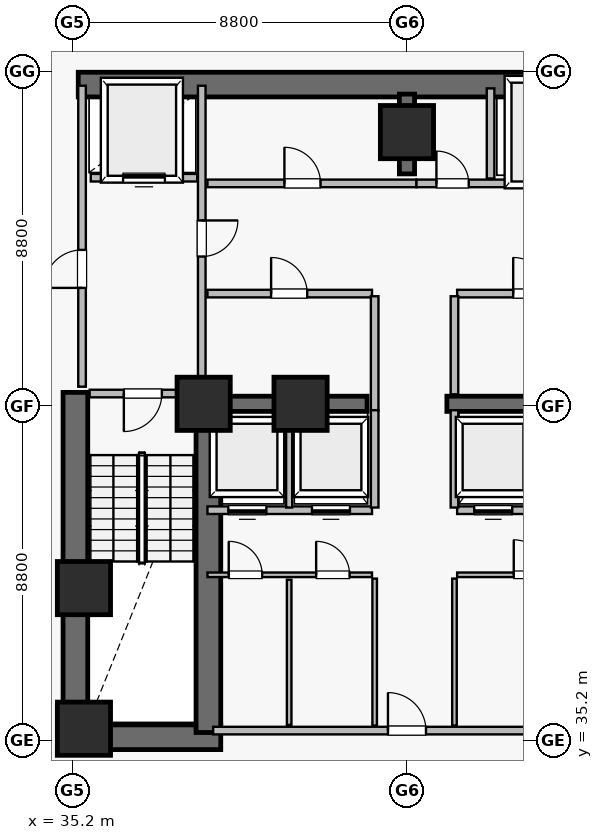
"""IFC4 building model, lengths in metres.
Left out: names, types, materials, properties, quantities, classifications, styles, units other than length and angle.
Written with IfcOpenShell. Run it as: python <this file> out.ifc"""

import sys

from ifc_helpers import new_model, si_unit, direction, frame, frame_2d, origin, origin_2d, place, context, subcontext, project, spatial, rectangle, extrude, element, fill, save


model = new_model("IFC4")
c1 = context("Model", 3, precision=1e-05, world=origin(), true_north=direction((0.0, 1.0)))
c2 = subcontext(c1, "Body", "Model", "MODEL_VIEW")
j1 = project(units=[si_unit("LENGTHUNIT", "METRE"), si_unit("PLANEANGLEUNIT", "RADIAN")], contexts=[c1])
p1 = place(None, origin())
s1 = spatial("IfcSite", under=j1, at=p1, CompositionType="ELEMENT")
p2 = place(p1, origin())
s2 = spatial("IfcBuilding", under=s1, at=p2, CompositionType="ELEMENT")
p3 = place(p2, frame((0.0, 0.0, -11.7)))
s3 = spatial("IfcBuildingStorey", under=s2, at=p3, CompositionType="ELEMENT", Elevation=-11.7)
p4 = place(p3, frame((35.35, 52.45, 0.0), z_axis=(0.0, 0.0, 1.0), x_axis=(1.0, 0.0, 0.0)))
e1 = element("IfcWall", 1, at=p4, inside=s3, PredefinedType="SHEAR", context=c2, shape_type="SweptSolid", body=[
    extrude(rectangle(XDim=17.3, YDim=0.65, at=frame_2d((8.65, 0.0))), origin(), (0.0, 0.0, 1.0), 3.58),
])
p5 = place(p3, frame((34.95, 35.275, 0.0), z_axis=(0.0, 0.0, 1.0), x_axis=(1.0, 0.0, 0.0)))
e2 = element("IfcWall", 2, at=p5, inside=s3, PredefinedType="SHEAR", context=c2, shape_type="SweptSolid", body=[
    extrude(rectangle(XDim=4.15, YDim=0.65, at=frame_2d((2.075, 0.0))), origin(), (0.0, 0.0, 1.0), 3.58),
])
p6 = place(p3, frame((35.275, 34.95, 0.0), z_axis=(0.0, 0.0, 1.0), x_axis=(0.0, 1.0, 0.0)))
e3 = element("IfcWall", 3, at=p6, inside=s3, PredefinedType="SHEAR", context=c2, shape_type="SweptSolid", body=[
    extrude(rectangle(XDim=9.4, YDim=0.65, at=frame_2d((4.7, 0.0))), origin(), (0.0, 0.0, 1.0), 3.58),
])
p7 = place(p3, frame((38.775, 35.4, 0.0), z_axis=(0.0, 0.0, 1.0), x_axis=(0.0, 1.0, 0.0)))
e4 = element("IfcWall", 4, at=p7, inside=s3, PredefinedType="SHEAR", context=c2, shape_type="SweptSolid", body=[
    extrude(rectangle(XDim=8.95, YDim=0.65, at=frame_2d((4.475, 0.0))), origin(), (0.0, 0.0, 1.0), 3.58),
])
p8 = place(p3, frame((44.0, 50.1, 0.0), z_axis=(0.0, 0.0, 1.0), x_axis=(0.0, 1.0, 0.0)))
e5 = element("IfcWall", 5, at=p8, inside=s3, PredefinedType="SHEAR", context=c2, shape_type="SweptSolid", body=[
    extrude(rectangle(XDim=2.1, YDim=0.4, at=frame_2d((1.05, 0.0))), origin(), (0.0, 0.0, 1.0), 3.58),
])
for number, where, z_axis, x_axis in (
    (6, (38.75, 44.05, 0.0), (0.0, 0.0, 1.0), (1.0, 0.0, 0.0)),
    (7, (45.05, 44.05, 0.0), (0.0, 0.0, 1.0), (1.0, 0.0, 0.0)),
):
    element("IfcWall", number, at=place(p3, frame(where, z_axis=z_axis, x_axis=x_axis)), inside=s3, PredefinedType="SHEAR", context=c2, shape_type="SweptSolid", body=[
        extrude(rectangle(XDim=4.2, YDim=0.4, at=frame_2d((2.1, 0.0))), origin(), (0.0, 0.0, 1.0), 3.58),
    ])
for number, where, z_axis, x_axis in (
    (8, (35.5, 35.5, 0.0), (0.0, 0.0, 1.0), (1.0, 0.0, 0.0)),
    (9, (38.65, 44.05, 0.0), (0.0, 0.0, 1.0), (1.0, 0.0, 0.0)),
    (10, (44.0, 51.2, 0.0), (0.0, 0.0, 1.0), (1.0, 0.0, 0.0)),
    (11, (35.5, 39.2, 0.0), (0.0, 0.0, 1.0), (1.0, 0.0, 0.0)),
    (12, (41.2, 44.05, 0.0), (0.0, 0.0, 1.0), (1.0, 0.0, 0.0)),
):
    element("IfcColumn", number, at=place(p3, frame(where, z_axis=z_axis, x_axis=x_axis)), inside=s3, PredefinedType="COLUMN", context=c2, shape_type="SweptSolid", body=[
        extrude(rectangle(XDim=1.4, YDim=1.4, at=origin_2d()), origin(), (0.0, 0.0, 1.0), 3.9),
    ])
p9 = place(p3, frame((38.9, 35.45, 0.0), z_axis=(0.0, 0.0, 1.0), x_axis=(1.0, 0.0, 0.0)))
e13 = element("IfcWall", 13, at=p9, inside=s3, PredefinedType="SOLIDWALL", context=c2, shape_type="SweptSolid", body=[
    extrude(rectangle(XDim=10.2, YDim=0.2, at=frame_2d((5.1, 0.0))), origin(), (0.0, 0.0, 1.0), 3.58),
])
p10 = place(p9, frame((4.6, 0.0, 0.0)))
e14 = element("IfcOpeningElement", 14, at=p10, cuts=e13, PredefinedType="OPENING", context=c2, shape_type="SweptSolid", body=[
    extrude(rectangle(XDim=1.0, YDim=2.15, at=frame_2d((0.5, 1.075))), frame((0.0, 0.11, 0.0), z_axis=(0.0, -1.0, 0.0), x_axis=(1.0, 0.0, 0.0)), (0.0, 0.0, 1.0), 0.22),
])
p11 = place(p3, frame((35.45, 44.5, 0.0), z_axis=(0.0, 0.0, 1.0), x_axis=(0.0, 1.0, 0.0)))
e15 = element("IfcWall", 15, at=p11, inside=s3, PredefinedType="SOLIDWALL", context=c2, shape_type="SweptSolid", body=[
    extrude(rectangle(XDim=7.92, YDim=0.2, at=frame_2d((3.96, 0.0))), origin(), (0.0, 0.0, 1.0), 3.58),
])
p12 = place(p11, frame((2.6, 0.0, 0.0)))
e16 = element("IfcOpeningElement", 16, at=p12, cuts=e15, PredefinedType="OPENING", context=c2, shape_type="SweptSolid", body=[
    extrude(rectangle(XDim=1.0, YDim=2.15, at=frame_2d((0.5, 1.075))), frame((0.0, 0.11, 0.0), z_axis=(0.0, -1.0, 0.0), x_axis=(1.0, 0.0, 0.0)), (0.0, 0.0, 1.0), 0.22),
])
p13 = place(p3, frame((38.6, 44.5, 0.0), z_axis=(0.0, 0.0, 1.0), x_axis=(0.0, 1.0, 0.0)))
e17 = element("IfcWall", 17, at=p13, inside=s3, PredefinedType="SOLIDWALL", context=c2, shape_type="SweptSolid", body=[
    extrude(rectangle(XDim=7.92, YDim=0.2, at=frame_2d((3.96, 0.0))), origin(), (0.0, 0.0, 1.0), 3.58),
])
p14 = place(p13, frame((3.425, 0.0, 0.0)))
e18 = element("IfcOpeningElement", 18, at=p14, cuts=e17, PredefinedType="OPENING", context=c2, shape_type="SweptSolid", body=[
    extrude(rectangle(XDim=0.95, YDim=2.15, at=frame_2d((0.475, 1.075))), frame((0.0, 0.11, 0.0), z_axis=(0.0, -1.0, 0.0), x_axis=(1.0, 0.0, 0.0)), (0.0, 0.0, 1.0), 0.22),
])
p15 = place(p3, frame((38.75, 49.85, 0.0), z_axis=(0.0, 0.0, 1.0), x_axis=(1.0, 0.0, 0.0)))
e19 = element("IfcWall", 19, at=p15, inside=s3, PredefinedType="SOLIDWALL", context=c2, shape_type="SweptSolid", body=[
    extrude(rectangle(XDim=5.5, YDim=0.2, at=frame_2d((2.75, 0.0))), origin(), (0.0, 0.0, 1.0), 3.58),
])
p16 = place(p15, frame((2.025, 0.0, 0.0)))
e20 = element("IfcOpeningElement", 20, at=p16, cuts=e19, PredefinedType="OPENING", context=c2, shape_type="SweptSolid", body=[
    extrude(rectangle(XDim=0.95, YDim=2.15, at=frame_2d((0.475, 1.075))), frame((0.0, 0.11, 0.0), z_axis=(0.0, -1.0, 0.0), x_axis=(1.0, 0.0, 0.0)), (0.0, 0.0, 1.0), 0.22),
])
p17 = place(p3, frame((44.25, 49.85, 0.0), z_axis=(0.0, 0.0, 1.0), x_axis=(1.0, 0.0, 0.0)))
e21 = element("IfcWall", 21, at=p17, inside=s3, PredefinedType="SOLIDWALL", context=c2, shape_type="SweptSolid", body=[
    extrude(rectangle(XDim=5.0, YDim=0.2, at=frame_2d((2.5, 0.0))), origin(), (0.0, 0.0, 1.0), 2.918),
])
p18 = place(p17, frame((0.525, 0.0, 0.0)))
e22 = element("IfcOpeningElement", 22, at=p18, cuts=e21, PredefinedType="OPENING", context=c2, shape_type="SweptSolid", body=[
    extrude(rectangle(XDim=0.85, YDim=2.1, at=frame_2d((0.425, 1.05))), frame((0.0, 0.11, 0.0), z_axis=(0.0, -1.0, 0.0), x_axis=(1.0, 0.0, 0.0)), (0.0, 0.0, 1.0), 0.22),
])
p19 = place(p17, frame((2.95, 0.0, 0.0)))
e23 = element("IfcOpeningElement", 23, at=p19, cuts=e21, PredefinedType="OPENING", context=c2, shape_type="SweptSolid", body=[
    extrude(rectangle(XDim=1.1, YDim=2.15, at=frame_2d((0.55, 1.075))), frame((0.0, 0.11, 0.0), z_axis=(0.0, -1.0, 0.0), x_axis=(1.0, 0.0, 0.0)), (0.0, 0.0, 1.0), 0.22),
])
p20 = place(p3, frame((38.75, 46.95, 0.0), z_axis=(0.0, 0.0, 1.0), x_axis=(1.0, 0.0, 0.0)))
e24 = element("IfcWall", 24, at=p20, inside=s3, PredefinedType="SOLIDWALL", context=c2, shape_type="SweptSolid", body=[
    extrude(rectangle(XDim=4.33, YDim=0.2, at=frame_2d((2.165, 0.0))), origin(), (0.0, 0.0, 1.0), 3.58),
])
p21 = place(p20, frame((1.675, 0.0, 0.0)))
e25 = element("IfcOpeningElement", 25, at=p21, cuts=e24, PredefinedType="OPENING", context=c2, shape_type="SweptSolid", body=[
    extrude(rectangle(XDim=0.95, YDim=2.15, at=frame_2d((0.475, 1.075))), frame((0.0, 0.11, 0.0), z_axis=(0.0, -1.0, 0.0), x_axis=(1.0, 0.0, 0.0)), (0.0, 0.0, 1.0), 0.22),
])
p22 = place(p3, frame((38.75, 41.25, 0.0), z_axis=(0.0, 0.0, 1.0), x_axis=(1.0, 0.0, 0.0)))
e26 = element("IfcWall", 26, at=p22, inside=s3, PredefinedType="SOLIDWALL", context=c2, shape_type="SweptSolid", body=[
    extrude(rectangle(XDim=4.33, YDim=0.2, at=frame_2d((2.165, 0.0))), origin(), (0.0, 0.0, 1.0), 3.58),
])
p23 = place(p22, frame((0.55, 0.0, 0.0)))
e27 = element("IfcOpeningElement", 27, at=p23, cuts=e26, PredefinedType="OPENING", context=c2, shape_type="SweptSolid", body=[
    extrude(rectangle(XDim=1.0, YDim=2.15, at=frame_2d((0.5, 1.075))), frame((0.0, 0.11, 0.0), z_axis=(0.0, -1.0, 0.0), x_axis=(1.0, 0.0, 0.0)), (0.0, 0.0, 1.0), 0.22),
])
p24 = place(p22, frame((2.75, 0.0, 0.0)))
e28 = element("IfcOpeningElement", 28, at=p24, cuts=e26, PredefinedType="OPENING", context=c2, shape_type="SweptSolid", body=[
    extrude(rectangle(XDim=1.0, YDim=2.15, at=frame_2d((0.5, 1.075))), frame((0.0, 0.11, 0.0), z_axis=(0.0, -1.0, 0.0), x_axis=(1.0, 0.0, 0.0)), (0.0, 0.0, 1.0), 0.22),
])
p25 = place(p3, frame((38.75, 39.55, 0.0), z_axis=(0.0, 0.0, 1.0), x_axis=(1.0, 0.0, 0.0)))
e29 = element("IfcWall", 29, at=p25, inside=s3, PredefinedType="PARTITIONING", context=c2, shape_type="SweptSolid", body=[
    extrude(rectangle(XDim=4.33, YDim=0.12, at=frame_2d((2.165, 0.0))), origin(), (0.0, 0.0, 1.0), 3.58),
])
p26 = place(p25, frame((0.56, 0.0, 0.0)))
e30 = element("IfcOpeningElement", 30, at=p26, cuts=e29, PredefinedType="OPENING", context=c2, shape_type="SweptSolid", body=[
    extrude(rectangle(XDim=0.88, YDim=2.1, at=frame_2d((0.44, 1.05))), frame((0.0, 0.07, 0.0), z_axis=(0.0, -1.0, 0.0), x_axis=(1.0, 0.0, 0.0)), (0.0, 0.0, 1.0), 0.14),
])
p27 = place(p25, frame((2.86, 0.0, 0.0)))
e31 = element("IfcOpeningElement", 31, at=p27, cuts=e29, PredefinedType="OPENING", context=c2, shape_type="SweptSolid", body=[
    extrude(rectangle(XDim=0.88, YDim=2.1, at=frame_2d((0.44, 1.05))), frame((0.0, 0.07, 0.0), z_axis=(0.0, -1.0, 0.0), x_axis=(1.0, 0.0, 0.0)), (0.0, 0.0, 1.0), 0.14),
])
p28 = place(p3, frame((45.32, 46.95, 0.0), z_axis=(0.0, 0.0, 1.0), x_axis=(1.0, 0.0, 0.0)))
e32 = element("IfcWall", 32, at=p28, inside=s3, PredefinedType="SOLIDWALL", context=c2, shape_type="SweptSolid", body=[
    extrude(rectangle(XDim=3.93, YDim=0.2, at=frame_2d((1.965, 0.0))), origin(), (0.0, 0.0, 1.0), 2.918),
])
p29 = place(p28, frame((1.475, 0.0, 0.0)))
e33 = element("IfcOpeningElement", 33, at=p29, cuts=e32, PredefinedType="OPENING", context=c2, shape_type="SweptSolid", body=[
    extrude(rectangle(XDim=0.95, YDim=2.15, at=frame_2d((0.475, 1.075))), frame((0.0, 0.11, 0.0), z_axis=(0.0, -1.0, 0.0), x_axis=(1.0, 0.0, 0.0)), (0.0, 0.0, 1.0), 0.22),
])
p30 = place(p3, frame((45.32, 41.25, 0.0), z_axis=(0.0, 0.0, 1.0), x_axis=(1.0, 0.0, 0.0)))
e34 = element("IfcWall", 34, at=p30, inside=s3, PredefinedType="SOLIDWALL", context=c2, shape_type="SweptSolid", body=[
    extrude(rectangle(XDim=3.93, YDim=0.2, at=frame_2d((1.965, 0.0))), origin(), (0.0, 0.0, 1.0), 3.58),
])
p31 = place(p30, frame((0.45, 0.0, 0.0)))
e35 = element("IfcOpeningElement", 35, at=p31, cuts=e34, PredefinedType="OPENING", context=c2, shape_type="SweptSolid", body=[
    extrude(rectangle(XDim=1.0, YDim=2.15, at=frame_2d((0.5, 1.075))), frame((0.0, 0.11, 0.0), z_axis=(0.0, -1.0, 0.0), x_axis=(1.0, 0.0, 0.0)), (0.0, 0.0, 1.0), 0.22),
])
p32 = place(p30, frame((2.45, 0.0, 0.0)))
e36 = element("IfcOpeningElement", 36, at=p32, cuts=e34, PredefinedType="OPENING", context=c2, shape_type="SweptSolid", body=[
    extrude(rectangle(XDim=1.0, YDim=2.15, at=frame_2d((0.5, 1.075))), frame((0.0, 0.11, 0.0), z_axis=(0.0, -1.0, 0.0), x_axis=(1.0, 0.0, 0.0)), (0.0, 0.0, 1.0), 0.22),
])
p33 = place(p3, frame((45.32, 39.55, 0.0), z_axis=(0.0, 0.0, 1.0), x_axis=(1.0, 0.0, 0.0)))
e37 = element("IfcWall", 37, at=p33, inside=s3, PredefinedType="PARTITIONING", context=c2, shape_type="SweptSolid", body=[
    extrude(rectangle(XDim=3.93, YDim=0.12, at=frame_2d((1.965, 0.0))), origin(), (0.0, 0.0, 1.0), 3.58),
])
p34 = place(p33, frame((1.49, 0.0, 0.0)))
e38 = element("IfcOpeningElement", 38, at=p34, cuts=e37, PredefinedType="OPENING", context=c2, shape_type="SweptSolid", body=[
    extrude(rectangle(XDim=0.92, YDim=2.1, at=frame_2d((0.46, 1.05))), frame((0.0, 0.07, 0.0), z_axis=(0.0, -1.0, 0.0), x_axis=(1.0, 0.0, 0.0)), (0.0, 0.0, 1.0), 0.14),
])
p35 = place(p3, frame((35.65, 44.32, 0.0), z_axis=(0.0, 0.0, 1.0), x_axis=(1.0, 0.0, 0.0)))
e39 = element("IfcWall", 39, at=p35, inside=s3, PredefinedType="SOLIDWALL", context=c2, shape_type="SweptSolid", body=[
    extrude(rectangle(XDim=2.8, YDim=0.2, at=frame_2d((1.4, 0.0))), origin(), (0.0, 0.0, 1.0), 3.58),
])
p36 = place(p35, frame((0.9, 0.0, 0.0)))
e40 = element("IfcOpeningElement", 40, at=p36, cuts=e39, PredefinedType="OPENING", context=c2, shape_type="SweptSolid", body=[
    extrude(rectangle(XDim=1.0, YDim=2.15, at=frame_2d((0.5, 1.075))), frame((0.0, 0.11, 0.0), z_axis=(0.0, -1.0, 0.0), x_axis=(1.0, 0.0, 0.0)), (0.0, 0.0, 1.0), 0.22),
])
p37 = place(p3, frame((35.68, 50.0, 0.0), z_axis=(0.0, 0.0, 1.0), x_axis=(1.0, 0.0, 0.0)))
e41 = element("IfcWall", 41, at=p37, inside=s3, PredefinedType="SOLIDWALL", context=c2, shape_type="SweptSolid", body=[
    extrude(rectangle(XDim=2.8, YDim=0.2, at=frame_2d((1.4, 0.0))), origin(), (0.0, 0.0, 1.0), 3.58),
])
p38 = place(p37, frame((0.85, 0.0, 0.0)))
e42 = element("IfcOpeningElement", 42, at=p38, cuts=e41, PredefinedType="OPENING", context=c2, shape_type="SweptSolid", body=[
    extrude(rectangle(XDim=1.1, YDim=2.15, at=frame_2d((0.55, 1.075))), frame((0.0, 0.11, 0.0), z_axis=(0.0, -1.0, 0.0), x_axis=(1.0, 0.0, 0.0)), (0.0, 0.0, 1.0), 0.22),
])
for number, where, z_axis, x_axis in (
    (43, (43.15, 35.58, 0.0), (0.0, 0.0, 1.0), (0.0, 1.0, 0.0)),
    (44, (45.25, 35.58, 0.0), (0.0, 0.0, 1.0), (0.0, 1.0, 0.0)),
):
    element("IfcWall", number, at=place(p3, frame(where, z_axis=z_axis, x_axis=x_axis)), inside=s3, PredefinedType="PARTITIONING", context=c2, shape_type="SweptSolid", body=[
        extrude(rectangle(XDim=3.87, YDim=0.12, at=frame_2d((1.935, 0.0))), origin(), (0.0, 0.0, 1.0), 3.58),
    ])
p39 = place(p3, frame((40.9, 35.6, 0.0), z_axis=(0.0, 0.0, 1.0), x_axis=(0.0, 1.0, 0.0)))
e45 = element("IfcWall", 45, at=p39, inside=s3, PredefinedType="PARTITIONING", context=c2, shape_type="SweptSolid", body=[
    extrude(rectangle(XDim=3.82, YDim=0.12, at=frame_2d((1.91, 0.0))), origin(), (0.0, 0.0, 1.0), 3.58),
])
p40 = place(p3, frame((43.15, 43.88, 0.0), z_axis=(0.0, 0.0, 1.0), x_axis=(0.0, 1.0, 0.0)))
e46 = element("IfcWall", 46, at=p40, inside=s3, PredefinedType="SOLIDWALL", context=c2, shape_type="SweptSolid", body=[
    extrude(rectangle(XDim=3.0, YDim=0.2, at=frame_2d((1.5, 0.0))), origin(), (0.0, 0.0, 1.0), 3.58),
])
p41 = place(p3, frame((45.25, 44.3, 0.0), z_axis=(0.0, 0.0, 1.0), x_axis=(0.0, 1.0, 0.0)))
e47 = element("IfcWall", 47, at=p41, inside=s3, PredefinedType="SOLIDWALL", context=c2, shape_type="SweptSolid", body=[
    extrude(rectangle(XDim=2.58, YDim=0.2, at=frame_2d((1.29, 0.0))), origin(), (0.0, 0.0, 1.0), 3.58),
])
for number, where, z_axis, x_axis in (
    (48, (43.15, 41.32, 0.0), (0.0, 0.0, 1.0), (0.0, 1.0, 0.0)),
    (49, (45.25, 41.32, 0.0), (0.0, 0.0, 1.0), (0.0, 1.0, 0.0)),
):
    element("IfcWall", number, at=place(p3, frame(where, z_axis=z_axis, x_axis=x_axis)), inside=s3, PredefinedType="SOLIDWALL", context=c2, shape_type="SweptSolid", body=[
        extrude(rectangle(XDim=2.56, YDim=0.2, at=frame_2d((1.28, 0.0))), origin(), (0.0, 0.0, 1.0), 3.58),
    ])
p42 = place(p3, frame((40.9, 41.32, 0.0), z_axis=(0.0, 0.0, 1.0), x_axis=(0.0, 1.0, 0.0)))
e50 = element("IfcWall", 50, at=p42, inside=s3, PredefinedType="SOLIDWALL", context=c2, shape_type="SweptSolid", body=[
    extrude(rectangle(XDim=2.53, YDim=0.16, at=frame_2d((1.265, 0.0))), origin(), (0.0, 0.0, 1.0), 3.58),
])
p43 = place(p3, frame((46.2, 49.98, 0.0), z_axis=(0.0, 0.0, 1.0), x_axis=(0.0, 1.0, 0.0)))
e51 = element("IfcWall", 51, at=p43, inside=s3, PredefinedType="SOLIDWALL", context=c2, shape_type="SweptSolid", body=[
    extrude(rectangle(XDim=2.37, YDim=0.2, at=frame_2d((1.185, 0.0))), origin(), (0.0, 0.0, 1.0), 3.58),
])
p44 = place(p36, frame((1.0, 0.0, 0.0), z_axis=(0.0, 0.0, 1.0), x_axis=(-1.0, 0.0, 0.0)))
e52 = element("IfcDoor", 52, at=p44, inside=s3, OperationType="SINGLE_SWING_LEFT", PredefinedType="DOOR", context=c2, shape_type="SweptSolid", body=[
    extrude(rectangle(XDim=1.0, YDim=2.15, at=frame_2d((0.5, 1.075))), frame((0.0, 0.025, 0.0), z_axis=(0.0, -1.0, 0.0), x_axis=(1.0, 0.0, 0.0)), (0.0, 0.0, 1.0), 0.05),
])
fill(e40, e52)
p45 = place(p12, origin())
e53 = element("IfcDoor", 53, at=p45, inside=s3, OperationType="SINGLE_SWING_LEFT", PredefinedType="DOOR", context=c2, shape_type="SweptSolid", body=[
    extrude(rectangle(XDim=1.0, YDim=2.15, at=frame_2d((0.5, 1.075))), frame((0.0, 0.025, 0.0), z_axis=(0.0, -1.0, 0.0), x_axis=(1.0, 0.0, 0.0)), (0.0, 0.0, 1.0), 0.05),
])
fill(e16, e53)
p46 = place(p14, frame((0.95, 0.0, 0.0), z_axis=(0.0, 0.0, 1.0), x_axis=(-1.0, 0.0, 0.0)))
e54 = element("IfcDoor", 54, at=p46, inside=s3, OperationType="SINGLE_SWING_RIGHT", PredefinedType="DOOR", context=c2, shape_type="SweptSolid", body=[
    extrude(rectangle(XDim=0.95, YDim=2.15, at=frame_2d((0.475, 1.075))), frame((0.0, 0.025, 0.0), z_axis=(0.0, -1.0, 0.0), x_axis=(1.0, 0.0, 0.0)), (0.0, 0.0, 1.0), 0.05),
])
fill(e18, e54)
p47 = place(p38, origin())
e55 = element("IfcDoor", 55, at=p47, inside=s3, OperationType="SLIDING_TO_LEFT", PredefinedType="DOOR", context=c2, shape_type="SweptSolid", body=[
    extrude(rectangle(XDim=1.1, YDim=2.15, at=frame_2d((0.55, 1.075))), frame((0.0, 0.025, 0.0), z_axis=(0.0, -1.0, 0.0), x_axis=(1.0, 0.0, 0.0)), (0.0, 0.0, 1.0), 0.05),
])
fill(e42, e55)
p48 = place(p10, origin())
e56 = element("IfcDoor", 56, at=p48, inside=s3, OperationType="SINGLE_SWING_LEFT", PredefinedType="DOOR", context=c2, shape_type="SweptSolid", body=[
    extrude(rectangle(XDim=1.0, YDim=2.15, at=frame_2d((0.5, 1.075))), frame((0.0, 0.025, 0.0), z_axis=(0.0, -1.0, 0.0), x_axis=(1.0, 0.0, 0.0)), (0.0, 0.0, 1.0), 0.05),
])
fill(e14, e56)
p49 = place(p16, origin())
e57 = element("IfcDoor", 57, at=p49, inside=s3, OperationType="SINGLE_SWING_LEFT", PredefinedType="DOOR", context=c2, shape_type="SweptSolid", body=[
    extrude(rectangle(XDim=0.95, YDim=2.15, at=frame_2d((0.475, 1.075))), frame((0.0, 0.025, 0.0), z_axis=(0.0, -1.0, 0.0), x_axis=(1.0, 0.0, 0.0)), (0.0, 0.0, 1.0), 0.05),
])
fill(e20, e57)
p50 = place(p18, origin())
e58 = element("IfcDoor", 58, at=p50, inside=s3, OperationType="SINGLE_SWING_LEFT", PredefinedType="DOOR", context=c2, shape_type="SweptSolid", body=[
    extrude(rectangle(XDim=0.85, YDim=2.1, at=frame_2d((0.425, 1.05))), frame((0.0, 0.025, 0.0), z_axis=(0.0, -1.0, 0.0), x_axis=(1.0, 0.0, 0.0)), (0.0, 0.0, 1.0), 0.05),
])
fill(e22, e58)
p51 = place(p21, origin())
e59 = element("IfcDoor", 59, at=p51, inside=s3, OperationType="SINGLE_SWING_LEFT", PredefinedType="DOOR", context=c2, shape_type="SweptSolid", body=[
    extrude(rectangle(XDim=0.95, YDim=2.15, at=frame_2d((0.475, 1.075))), frame((0.0, 0.025, 0.0), z_axis=(0.0, -1.0, 0.0), x_axis=(1.0, 0.0, 0.0)), (0.0, 0.0, 1.0), 0.05),
])
fill(e25, e59)
p52 = place(p29, origin())
e60 = element("IfcDoor", 60, at=p52, inside=s3, OperationType="SINGLE_SWING_LEFT", PredefinedType="DOOR", context=c2, shape_type="SweptSolid", body=[
    extrude(rectangle(XDim=0.95, YDim=2.15, at=frame_2d((0.475, 1.075))), frame((0.0, 0.025, 0.0), z_axis=(0.0, -1.0, 0.0), x_axis=(1.0, 0.0, 0.0)), (0.0, 0.0, 1.0), 0.05),
])
fill(e33, e60)
p53 = place(p23, frame((1.0, 0.0, 0.0), z_axis=(0.0, 0.0, 1.0), x_axis=(-1.0, 0.0, 0.0)))
e61 = element("IfcDoor", 61, at=p53, inside=s3, OperationType="SLIDING_TO_LEFT", PredefinedType="DOOR", context=c2, shape_type="SweptSolid", body=[
    extrude(rectangle(XDim=1.0, YDim=2.15, at=frame_2d((0.5, 1.075))), frame((0.0, 0.025, 0.0), z_axis=(0.0, -1.0, 0.0), x_axis=(1.0, 0.0, 0.0)), (0.0, 0.0, 1.0), 0.05),
])
fill(e27, e61)
p54 = place(p24, frame((1.0, 0.0, 0.0), z_axis=(0.0, 0.0, 1.0), x_axis=(-1.0, 0.0, 0.0)))
e62 = element("IfcDoor", 62, at=p54, inside=s3, OperationType="SLIDING_TO_LEFT", PredefinedType="DOOR", context=c2, shape_type="SweptSolid", body=[
    extrude(rectangle(XDim=1.0, YDim=2.15, at=frame_2d((0.5, 1.075))), frame((0.0, 0.025, 0.0), z_axis=(0.0, -1.0, 0.0), x_axis=(1.0, 0.0, 0.0)), (0.0, 0.0, 1.0), 0.05),
])
fill(e28, e62)
p55 = place(p31, frame((1.0, 0.0, 0.0), z_axis=(0.0, 0.0, 1.0), x_axis=(-1.0, 0.0, 0.0)))
e63 = element("IfcDoor", 63, at=p55, inside=s3, OperationType="SLIDING_TO_LEFT", PredefinedType="DOOR", context=c2, shape_type="SweptSolid", body=[
    extrude(rectangle(XDim=1.0, YDim=2.15, at=frame_2d((0.5, 1.075))), frame((0.0, 0.025, 0.0), z_axis=(0.0, -1.0, 0.0), x_axis=(1.0, 0.0, 0.0)), (0.0, 0.0, 1.0), 0.05),
])
fill(e35, e63)
p56 = place(p26, origin())
e64 = element("IfcDoor", 64, at=p56, inside=s3, OperationType="SINGLE_SWING_LEFT", PredefinedType="DOOR", context=c2, shape_type="SweptSolid", body=[
    extrude(rectangle(XDim=0.88, YDim=2.1, at=frame_2d((0.44, 1.05))), frame((0.0, 0.025, 0.0), z_axis=(0.0, -1.0, 0.0), x_axis=(1.0, 0.0, 0.0)), (0.0, 0.0, 1.0), 0.05),
])
fill(e30, e64)
p57 = place(p27, origin())
e65 = element("IfcDoor", 65, at=p57, inside=s3, OperationType="SINGLE_SWING_LEFT", PredefinedType="DOOR", context=c2, shape_type="SweptSolid", body=[
    extrude(rectangle(XDim=0.88, YDim=2.1, at=frame_2d((0.44, 1.05))), frame((0.0, 0.025, 0.0), z_axis=(0.0, -1.0, 0.0), x_axis=(1.0, 0.0, 0.0)), (0.0, 0.0, 1.0), 0.05),
])
fill(e31, e65)
p58 = place(p34, origin())
e66 = element("IfcDoor", 66, at=p58, inside=s3, OperationType="SINGLE_SWING_LEFT", PredefinedType="DOOR", context=c2, shape_type="SweptSolid", body=[
    extrude(rectangle(XDim=0.92, YDim=2.1, at=frame_2d((0.46, 1.05))), frame((0.0, 0.025, 0.0), z_axis=(0.0, -1.0, 0.0), x_axis=(1.0, 0.0, 0.0)), (0.0, 0.0, 1.0), 0.05),
])
fill(e38, e66)
save(model, sys.argv[1])
